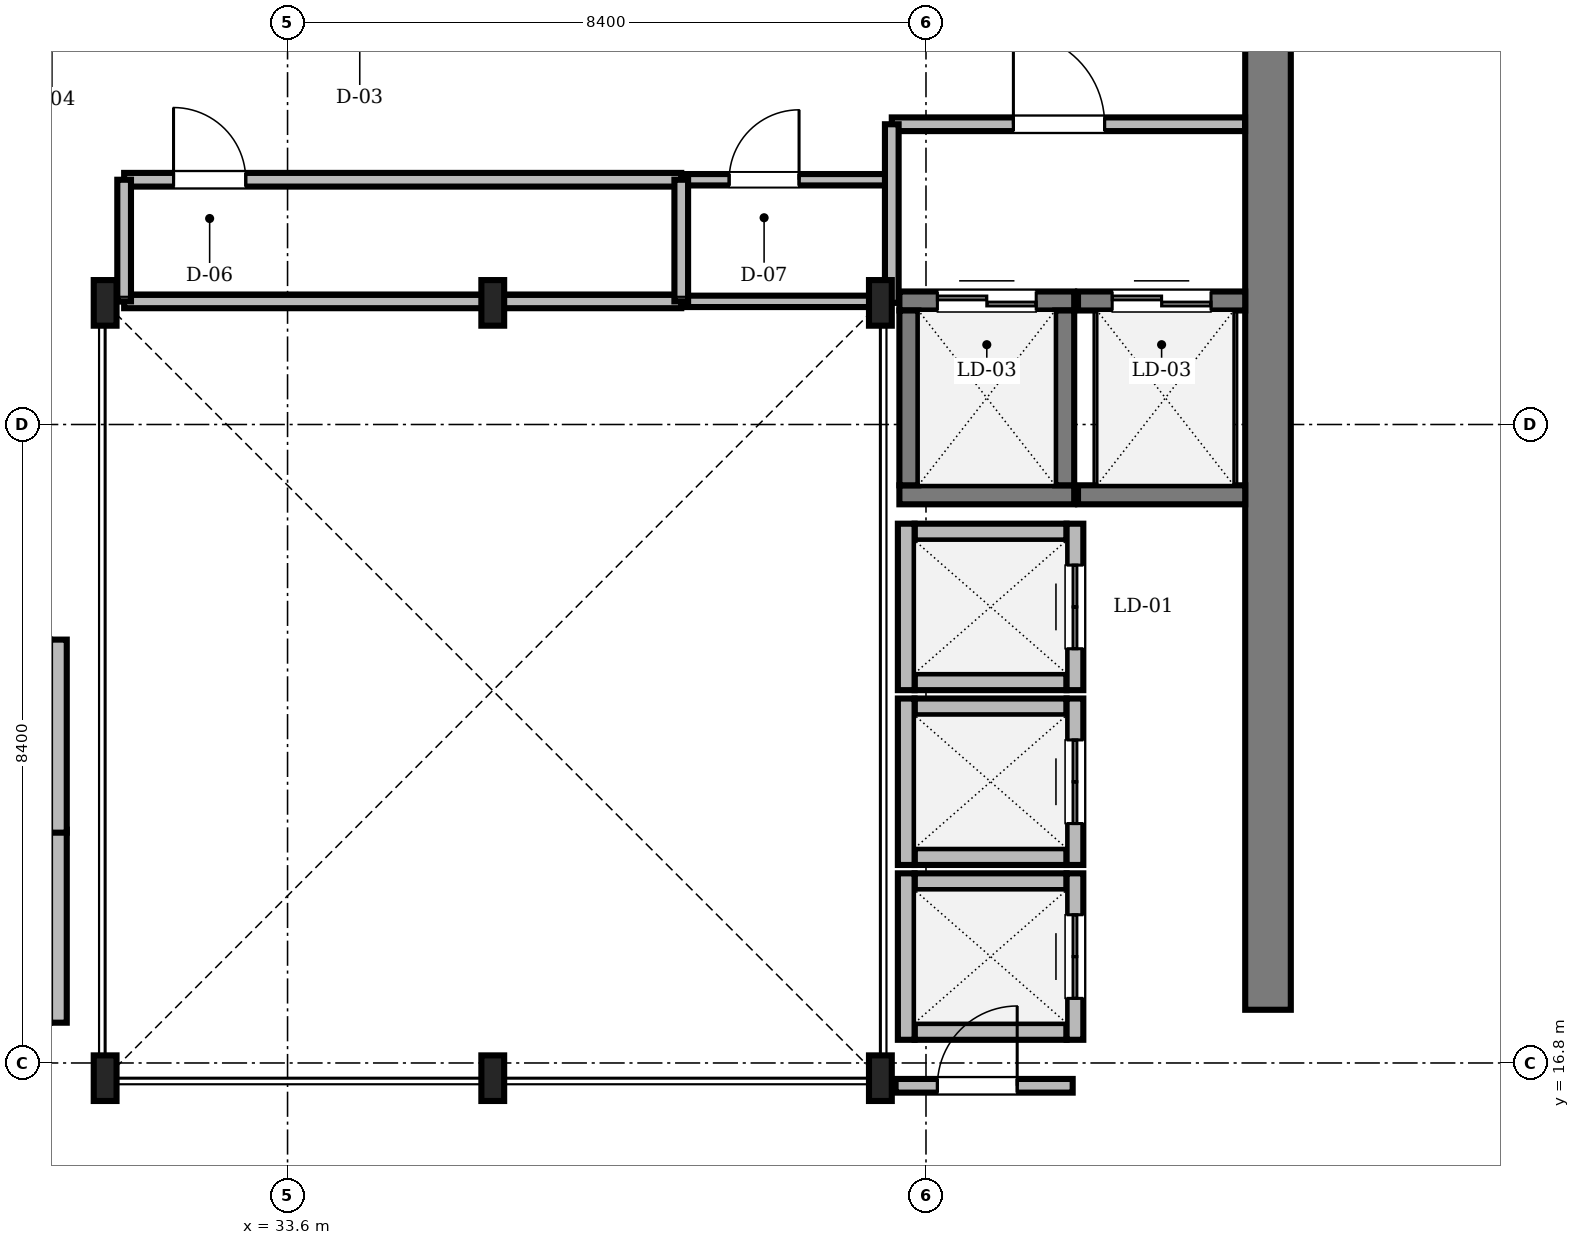
"""IFC4 building model, lengths in metres.
Left out: names, types, materials, properties, quantities, classifications, styles, units other than length and angle.
Written with IfcOpenShell. Run it as: python <this file> out.ifc"""

import sys

from ifc_helpers import new_model, si_unit, direction, frame, frame_2d, origin, origin_2d, place, context, subcontext, project, spatial, rectangle, i_section, extrude, source, transform, mapped, element, fill, save


model = new_model("IFC4")
c1 = context("Model", 3, precision=1e-05, world=origin(), true_north=direction((0.0, 1.0)))
c2 = subcontext(c1, "Body", "Model", "MODEL_VIEW")
j1 = project(units=[si_unit("LENGTHUNIT", "METRE"), si_unit("PLANEANGLEUNIT", "RADIAN")], contexts=[c1])
p1 = place(None, origin())
s1 = spatial("IfcSite", under=j1, at=p1, CompositionType="ELEMENT")
p2 = place(p1, origin())
s2 = spatial("IfcBuilding", under=s1, at=p2, CompositionType="ELEMENT")
p3 = place(p2, frame((0.0, 0.0, 258.5)))
s3 = spatial("IfcBuildingStorey", under=s2, at=p3, CompositionType="ELEMENT", Elevation=258.5)
m1 = source(origin(), c2, "Body", "SweptSolid", [
    extrude(rectangle(XDim=13.15, YDim=0.6, at=frame_2d((6.575, 0.0))), origin(), (0.0, 0.0, 1.0), 3.65),
])
p4 = place(p3, frame((46.5, 17.5, 0.0), z_axis=(0.0, 0.0, 1.0), x_axis=(0.0, 1.0, 0.0)))
e1 = element("IfcWall", 1, at=p4, inside=s3, PredefinedType="SHEAR", context=c2, shape_type="MappedRepresentation", body=[
    mapped(m1, transform((0.0, 0.0, 0.0), scale=1.0)),
])
m2 = source(origin(), c2, "Body", "SweptSolid", [
    extrude(i_section(OverallWidth=0.3, OverallDepth=0.6, WebThickness=0.015, FlangeThickness=0.03, FilletRadius=0.027, at=origin_2d()), origin(), (0.0, 0.0, 1.0), 3.65),
])
for number, where, z_axis, x_axis in (
    (2, (31.2, 16.6, 0.0), (0.0, 0.0, 1.0), (1.0, 0.0, 0.0)),
    (3, (36.3, 16.6, 0.0), (0.0, 0.0, 1.0), (1.0, 0.0, 0.0)),
    (4, (41.4, 16.6, 0.0), (0.0, 0.0, 1.0), (1.0, 0.0, 0.0)),
    (5, (41.4, 26.8, 0.0), (0.0, 0.0, 1.0), (1.0, 0.0, 0.0)),
    (6, (36.3, 26.8, 0.0), (0.0, 0.0, 1.0), (1.0, 0.0, 0.0)),
    (7, (31.2, 26.8, 0.0), (0.0, 0.0, 1.0), (1.0, 0.0, 0.0)),
):
    element("IfcColumn", number, at=place(p3, frame(where, z_axis=z_axis, x_axis=x_axis)), inside=s3, PredefinedType="COLUMN", context=c2, shape_type="MappedRepresentation", body=[
        mapped(m2, transform((0.0, 0.0, 0.0), scale=1.0)),
    ])
m3 = source(origin(), c2, "Body", "SweptSolid", [
    extrude(rectangle(XDim=2.0, YDim=0.22, at=frame_2d((1.0, 0.0))), origin(), (0.0, 0.0, 1.0), 3.65),
])
for number, where, z_axis, x_axis in (
    (8, (41.85, 21.815, 0.0), (0.0, 0.0, 1.0), (1.0, 0.0, 0.0)),
    (9, (41.85, 23.785, 0.0), (0.0, 0.0, 1.0), (1.0, 0.0, 0.0)),
):
    element("IfcWall", number, at=place(p3, frame(where, z_axis=z_axis, x_axis=x_axis)), inside=s3, PredefinedType="SOLIDWALL", context=c2, shape_type="MappedRepresentation", body=[
        mapped(m3, transform((0.0, 0.0, 0.0), scale=1.0)),
    ])
m4 = source(origin(), c2, "Body", "SweptSolid", [
    extrude(rectangle(XDim=2.19, YDim=0.22, at=frame_2d((1.095, 0.0))), origin(), (0.0, 0.0, 1.0), 3.65),
])
p5 = place(p3, frame((41.74, 21.705, 0.0), z_axis=(0.0, 0.0, 1.0), x_axis=(0.0, 1.0, 0.0)))
e10 = element("IfcWall", 10, at=p5, inside=s3, PredefinedType="SOLIDWALL", context=c2, shape_type="MappedRepresentation", body=[
    mapped(m4, transform((0.0, 0.0, 0.0), scale=1.0)),
])
p6 = place(p3, frame((43.96, 21.705, 0.0), z_axis=(0.0, 0.0, 1.0), x_axis=(0.0, 1.0, 0.0)))
e11 = element("IfcWall", 11, at=p6, inside=s3, PredefinedType="SOLIDWALL", context=c2, shape_type="MappedRepresentation", body=[
    mapped(m4, transform((0.0, 0.0, 0.0), scale=1.0)),
])
m5 = source(origin(), c2, "Body", "SweptSolid", [
    extrude(rectangle(XDim=1.1, YDim=2.2, at=frame_2d((0.55, 1.1))), frame((0.0, 0.12, 0.0), z_axis=(0.0, -1.0, 0.0), x_axis=(1.0, 0.0, 0.0)), (0.0, 0.0, 1.0), 0.24),
])
p7 = place(p6, frame((0.545, 0.0, 0.0)))
e12 = element("IfcOpeningElement", 12, at=p7, cuts=e11, PredefinedType="OPENING", context=c2, shape_type="MappedRepresentation", body=[
    mapped(m5, transform((0.0, 0.0, 0.0), scale=1.0)),
])
for number, where, z_axis, x_axis in (
    (13, (41.85, 19.515, 0.0), (0.0, 0.0, 1.0), (1.0, 0.0, 0.0)),
    (14, (41.85, 21.485, 0.0), (0.0, 0.0, 1.0), (1.0, 0.0, 0.0)),
):
    element("IfcWall", number, at=place(p3, frame(where, z_axis=z_axis, x_axis=x_axis)), inside=s3, PredefinedType="SOLIDWALL", context=c2, shape_type="MappedRepresentation", body=[
        mapped(m3, transform((0.0, 0.0, 0.0), scale=1.0)),
    ])
p8 = place(p3, frame((41.74, 19.405, 0.0), z_axis=(0.0, 0.0, 1.0), x_axis=(0.0, 1.0, 0.0)))
e15 = element("IfcWall", 15, at=p8, inside=s3, PredefinedType="SOLIDWALL", context=c2, shape_type="MappedRepresentation", body=[
    mapped(m4, transform((0.0, 0.0, 0.0), scale=1.0)),
])
p9 = place(p3, frame((43.96, 19.405, 0.0), z_axis=(0.0, 0.0, 1.0), x_axis=(0.0, 1.0, 0.0)))
e16 = element("IfcWall", 16, at=p9, inside=s3, PredefinedType="SOLIDWALL", context=c2, shape_type="MappedRepresentation", body=[
    mapped(m4, transform((0.0, 0.0, 0.0), scale=1.0)),
])
p10 = place(p9, frame((0.545, 0.0, 0.0)))
e17 = element("IfcOpeningElement", 17, at=p10, cuts=e16, PredefinedType="OPENING", context=c2, shape_type="MappedRepresentation", body=[
    mapped(m5, transform((0.0, 0.0, 0.0), scale=1.0)),
])
for number, where, z_axis, x_axis in (
    (18, (41.85, 17.215, 0.0), (0.0, 0.0, 1.0), (1.0, 0.0, 0.0)),
    (19, (41.85, 19.185, 0.0), (0.0, 0.0, 1.0), (1.0, 0.0, 0.0)),
):
    element("IfcWall", number, at=place(p3, frame(where, z_axis=z_axis, x_axis=x_axis)), inside=s3, PredefinedType="SOLIDWALL", context=c2, shape_type="MappedRepresentation", body=[
        mapped(m3, transform((0.0, 0.0, 0.0), scale=1.0)),
    ])
p11 = place(p3, frame((41.74, 17.105, 0.0), z_axis=(0.0, 0.0, 1.0), x_axis=(0.0, 1.0, 0.0)))
e20 = element("IfcWall", 20, at=p11, inside=s3, PredefinedType="SOLIDWALL", context=c2, shape_type="MappedRepresentation", body=[
    mapped(m4, transform((0.0, 0.0, 0.0), scale=1.0)),
])
p12 = place(p3, frame((43.96, 17.105, 0.0), z_axis=(0.0, 0.0, 1.0), x_axis=(0.0, 1.0, 0.0)))
e21 = element("IfcWall", 21, at=p12, inside=s3, PredefinedType="SOLIDWALL", context=c2, shape_type="MappedRepresentation", body=[
    mapped(m4, transform((0.0, 0.0, 0.0), scale=1.0)),
])
p13 = place(p12, frame((0.545, 0.0, 0.0)))
e22 = element("IfcOpeningElement", 22, at=p13, cuts=e21, PredefinedType="OPENING", context=c2, shape_type="MappedRepresentation", body=[
    mapped(m5, transform((0.0, 0.0, 0.0), scale=1.0)),
])
m6 = source(origin(), c2, "Body", "SweptSolid", [
    extrude(rectangle(XDim=2.54, YDim=0.22, at=frame_2d((1.27, 0.0))), origin(), (0.0, 0.0, 1.0), 3.65),
])
for number, where, z_axis, x_axis in (
    (23, (30.585, 17.33, 0.0), (0.0, 0.0, 1.0), (0.0, 1.0, 0.0)),
    (24, (30.585, 19.83, 0.0), (0.0, 0.0, 1.0), (0.0, 1.0, 0.0)),
):
    element("IfcWall", number, at=place(p3, frame(where, z_axis=z_axis, x_axis=x_axis)), inside=s3, PredefinedType="SOLIDWALL", context=c2, shape_type="MappedRepresentation", body=[
        mapped(m6, transform((0.0, 0.0, 0.0), scale=1.0)),
    ])
m7 = source(origin(), c2, "Body", "SweptSolid", [
    extrude(rectangle(XDim=2.3, YDim=0.25, at=frame_2d((1.15, 0.0))), origin(), (0.0, 0.0, 1.0), 3.65),
])
p14 = place(p3, frame((41.65, 24.275, 0.0), z_axis=(0.0, 0.0, 1.0), x_axis=(1.0, 0.0, 0.0)))
e25 = element("IfcWall", 25, at=p14, inside=s3, PredefinedType="SOLIDWALL", context=c2, shape_type="MappedRepresentation", body=[
    mapped(m7, transform((0.0, 0.0, 0.0), scale=1.0)),
])
p15 = place(p3, frame((41.65, 26.825, 0.0), z_axis=(0.0, 0.0, 1.0), x_axis=(1.0, 0.0, 0.0)))
e26 = element("IfcWall", 26, at=p15, inside=s3, PredefinedType="SOLIDWALL", context=c2, shape_type="MappedRepresentation", body=[
    mapped(m7, transform((0.0, 0.0, 0.0), scale=1.0)),
])
m8 = source(origin(), c2, "Body", "SweptSolid", [
    extrude(rectangle(XDim=1.3, YDim=2.3, at=frame_2d((0.65, 1.15))), frame((0.0, 0.135, 0.0), z_axis=(0.0, -1.0, 0.0), x_axis=(1.0, 0.0, 0.0)), (0.0, 0.0, 1.0), 0.27),
])
p16 = place(p15, frame((0.5, 0.0, 0.0)))
e27 = element("IfcOpeningElement", 27, at=p16, cuts=e26, PredefinedType="OPENING", context=c2, shape_type="MappedRepresentation", body=[
    mapped(m8, transform((0.0, 0.0, 0.0), scale=1.0)),
])
for number, where, z_axis, x_axis in (
    (28, (41.775, 24.4, 0.0), (0.0, 0.0, 1.0), (0.0, 1.0, 0.0)),
    (29, (43.825, 24.4, 0.0), (0.0, 0.0, 1.0), (0.0, 1.0, 0.0)),
):
    element("IfcWall", number, at=place(p3, frame(where, z_axis=z_axis, x_axis=x_axis)), inside=s3, PredefinedType="SOLIDWALL", context=c2, shape_type="MappedRepresentation", body=[
        mapped(m7, transform((0.0, 0.0, 0.0), scale=1.0)),
    ])
m9 = source(origin(), c2, "Body", "SweptSolid", [
    extrude(rectangle(XDim=2.2, YDim=0.25, at=frame_2d((1.1, 0.0))), origin(), (0.0, 0.0, 1.0), 3.65),
])
p17 = place(p3, frame((44.0, 24.275, 0.0), z_axis=(0.0, 0.0, 1.0), x_axis=(1.0, 0.0, 0.0)))
e30 = element("IfcWall", 30, at=p17, inside=s3, PredefinedType="SOLIDWALL", context=c2, shape_type="MappedRepresentation", body=[
    mapped(m9, transform((0.0, 0.0, 0.0), scale=1.0)),
])
p18 = place(p3, frame((44.0, 26.825, 0.0), z_axis=(0.0, 0.0, 1.0), x_axis=(1.0, 0.0, 0.0)))
e31 = element("IfcWall", 31, at=p18, inside=s3, PredefinedType="SOLIDWALL", context=c2, shape_type="MappedRepresentation", body=[
    mapped(m9, transform((0.0, 0.0, 0.0), scale=1.0)),
])
p19 = place(p18, frame((0.45, 0.0, 0.0)))
e32 = element("IfcOpeningElement", 32, at=p19, cuts=e31, PredefinedType="OPENING", context=c2, shape_type="MappedRepresentation", body=[
    mapped(m8, transform((0.0, 0.0, 0.0), scale=1.0)),
])
m10 = source(origin(), c2, "Body", "SweptSolid", [
    extrude(rectangle(XDim=7.33, YDim=0.18, at=frame_2d((3.665, 0.0))), origin(), (0.0, 0.0, 1.0), 3.282),
])
p20 = place(p3, frame((31.45, 28.42, 0.0), z_axis=(0.0, 0.0, 1.0), x_axis=(1.0, 0.0, 0.0)))
e33 = element("IfcWall", 33, at=p20, inside=s3, PredefinedType="PARTITIONING", context=c2, shape_type="MappedRepresentation", body=[
    mapped(m10, transform((0.0, 0.0, 0.0), scale=1.0)),
])
m11 = source(origin(), c2, "Body", "SweptSolid", [
    extrude(rectangle(XDim=0.95, YDim=2.15, at=frame_2d((0.475, 1.075))), frame((0.0, 0.1, 0.0), z_axis=(0.0, -1.0, 0.0), x_axis=(1.0, 0.0, 0.0)), (0.0, 0.0, 1.0), 0.2),
])
p21 = place(p20, frame((0.65, 0.0, 0.0)))
e34 = element("IfcOpeningElement", 34, at=p21, cuts=e33, PredefinedType="OPENING", context=c2, shape_type="MappedRepresentation", body=[
    mapped(m11, transform((0.0, 0.0, 0.0), scale=1.0)),
])
m12 = source(origin(), c2, "Body", "SweptSolid", [
    extrude(rectangle(XDim=4.648, YDim=0.18, at=frame_2d((2.324, 0.0))), origin(), (0.0, 0.0, 1.0), 3.282),
])
p22 = place(p3, frame((41.55, 29.15, 0.0), z_axis=(0.0, 0.0, 1.0), x_axis=(1.0, 0.0, 0.0)))
e35 = element("IfcWall", 35, at=p22, inside=s3, PredefinedType="PARTITIONING", context=c2, shape_type="MappedRepresentation", body=[
    mapped(m12, transform((0.0, 0.0, 0.0), scale=1.0)),
])
m13 = source(origin(), c2, "Body", "SweptSolid", [
    extrude(rectangle(XDim=1.2, YDim=2.2, at=frame_2d((0.6, 1.1))), frame((0.0, 0.1, 0.0), z_axis=(0.0, -1.0, 0.0), x_axis=(1.0, 0.0, 0.0)), (0.0, 0.0, 1.0), 0.2),
])
p23 = place(p22, frame((1.6, 0.0, 0.0)))
e36 = element("IfcOpeningElement", 36, at=p23, cuts=e35, PredefinedType="OPENING", context=c2, shape_type="MappedRepresentation", body=[
    mapped(m13, transform((0.0, 0.0, 0.0), scale=1.0)),
])
m14 = source(origin(), c2, "Body", "SweptSolid", [
    extrude(rectangle(XDim=2.74, YDim=0.15, at=frame_2d((1.37, 0.0))), origin(), (0.0, 0.0, 1.0), 3.65),
])
p24 = place(p3, frame((38.78, 28.42, 0.0), z_axis=(0.0, 0.0, 1.0), x_axis=(1.0, 0.0, 0.0)))
e37 = element("IfcWall", 37, at=p24, inside=s3, PredefinedType="PARTITIONING", context=c2, shape_type="MappedRepresentation", body=[
    mapped(m14, transform((0.0, 0.0, 0.0), scale=1.0)),
])
m15 = source(origin(), c2, "Body", "SweptSolid", [
    extrude(rectangle(XDim=0.92, YDim=2.1, at=frame_2d((0.46, 1.05))), frame((0.0, 0.085, 0.0), z_axis=(0.0, -1.0, 0.0), x_axis=(1.0, 0.0, 0.0)), (0.0, 0.0, 1.0), 0.17),
])
p25 = place(p24, frame((0.63, 0.0, 0.0)))
e38 = element("IfcOpeningElement", 38, at=p25, cuts=e37, PredefinedType="OPENING", context=c2, shape_type="MappedRepresentation", body=[
    mapped(m15, transform((0.0, 0.0, 0.0), scale=1.0)),
])
m16 = source(origin(), c2, "Body", "SweptSolid", [
    extrude(rectangle(XDim=2.33, YDim=0.18, at=frame_2d((1.165, 0.0))), origin(), (0.0, 0.0, 1.0), 3.092),
])
p26 = place(p3, frame((41.6, 16.5, 0.0), z_axis=(0.0, 0.0, 1.0), x_axis=(1.0, 0.0, 0.0)))
e39 = element("IfcWall", 39, at=p26, inside=s3, PredefinedType="PARTITIONING", context=c2, shape_type="MappedRepresentation", body=[
    mapped(m16, transform((0.0, 0.0, 0.0), scale=1.0)),
])
m17 = source(origin(), c2, "Body", "SweptSolid", [
    extrude(rectangle(XDim=1.05, YDim=2.2, at=frame_2d((0.525, 1.1))), frame((0.0, 0.1, 0.0), z_axis=(0.0, -1.0, 0.0), x_axis=(1.0, 0.0, 0.0)), (0.0, 0.0, 1.0), 0.2),
])
p27 = place(p26, frame((0.55, 0.0, 0.0)))
e40 = element("IfcOpeningElement", 40, at=p27, cuts=e39, PredefinedType="OPENING", context=c2, shape_type="MappedRepresentation", body=[
    mapped(m17, transform((0.0, 0.0, 0.0), scale=1.0)),
])
m18 = source(origin(), c2, "Body", "SweptSolid", [
    extrude(rectangle(XDim=7.33, YDim=0.18, at=frame_2d((3.665, 0.0))), origin(), (0.0, 0.0, 1.0), 3.192),
])
p28 = place(p3, frame((31.45, 26.82, 0.0), z_axis=(0.0, 0.0, 1.0), x_axis=(1.0, 0.0, 0.0)))
e41 = element("IfcWall", 41, at=p28, inside=s3, PredefinedType="PARTITIONING", context=c2, shape_type="MappedRepresentation", body=[
    mapped(m18, transform((0.0, 0.0, 0.0), scale=1.0)),
])
m19 = source(origin(), c2, "Body", "SweptSolid", [
    extrude(rectangle(XDim=2.74, YDim=0.15, at=frame_2d((1.37, 0.0))), origin(), (0.0, 0.0, 1.0), 3.192),
])
p29 = place(p3, frame((38.78, 26.82, 0.0), z_axis=(0.0, 0.0, 1.0), x_axis=(1.0, 0.0, 0.0)))
e42 = element("IfcWall", 42, at=p29, inside=s3, PredefinedType="PARTITIONING", context=c2, shape_type="MappedRepresentation", body=[
    mapped(m19, transform((0.0, 0.0, 0.0), scale=1.0)),
])
m20 = source(origin(), c2, "Body", "SweptSolid", [
    extrude(rectangle(XDim=2.35, YDim=0.18, at=frame_2d((1.175, 0.0))), origin(), (0.0, 0.0, 1.0), 3.282),
])
p30 = place(p3, frame((41.55, 26.8, 0.0), z_axis=(0.0, 0.0, 1.0), x_axis=(0.0, 1.0, 0.0)))
e43 = element("IfcWall", 43, at=p30, inside=s3, PredefinedType="PARTITIONING", context=c2, shape_type="MappedRepresentation", body=[
    mapped(m20, transform((0.0, 0.0, 0.0), scale=1.0)),
])
m21 = source(origin(), c2, "Body", "SweptSolid", [
    extrude(rectangle(XDim=1.6, YDim=0.18, at=frame_2d((0.8, 0.0))), origin(), (0.0, 0.0, 1.0), 3.192),
])
for number, where, z_axis, x_axis in (
    (44, (31.45, 26.82, 0.0), (0.0, 0.0, 1.0), (0.0, 1.0, 0.0)),
    (45, (38.78, 26.82, 0.0), (0.0, 0.0, 1.0), (0.0, 1.0, 0.0)),
):
    element("IfcWall", number, at=place(p3, frame(where, z_axis=z_axis, x_axis=x_axis)), inside=s3, PredefinedType="PARTITIONING", context=c2, shape_type="MappedRepresentation", body=[
        mapped(m21, transform((0.0, 0.0, 0.0), scale=1.0)),
    ])
m22 = source(origin(), c2, "Body", "SweptSolid", [
    extrude(rectangle(XDim=1.1, YDim=2.2, at=frame_2d((0.55, 1.1))), frame((0.0, 0.025, 0.0), z_axis=(0.0, -1.0, 0.0), x_axis=(1.0, 0.0, 0.0)), (0.0, 0.0, 1.0), 0.05),
])
p31 = place(p7, origin())
e46 = element("IfcDoor", 46, at=p31, inside=s3, OperationType="DOUBLE_DOOR_SLIDING", PredefinedType="DOOR", context=c2, shape_type="MappedRepresentation", body=[
    mapped(m22, transform((0.0, 0.0, 0.0), scale=1.0)),
])
fill(e12, e46)
p32 = place(p10, origin())
e47 = element("IfcDoor", 47, at=p32, inside=s3, OperationType="DOUBLE_DOOR_SLIDING", PredefinedType="DOOR", context=c2, shape_type="MappedRepresentation", body=[
    mapped(m22, transform((0.0, 0.0, 0.0), scale=1.0)),
])
fill(e17, e47)
p33 = place(p13, origin())
e48 = element("IfcDoor", 48, at=p33, inside=s3, OperationType="DOUBLE_DOOR_SLIDING", PredefinedType="DOOR", context=c2, shape_type="MappedRepresentation", body=[
    mapped(m22, transform((0.0, 0.0, 0.0), scale=1.0)),
])
fill(e22, e48)
m23 = source(origin(), c2, "Body", "SweptSolid", [
    extrude(rectangle(XDim=1.3, YDim=2.3, at=frame_2d((0.65, 1.15))), frame((0.0, 0.025, 0.0), z_axis=(0.0, -1.0, 0.0), x_axis=(1.0, 0.0, 0.0)), (0.0, 0.0, 1.0), 0.05),
])
p34 = place(p16, origin())
e49 = element("IfcDoor", 49, at=p34, inside=s3, OperationType="DOUBLE_DOOR_SLIDING", PredefinedType="DOOR", context=c2, shape_type="MappedRepresentation", body=[
    mapped(m23, transform((0.0, 0.0, 0.0), scale=1.0)),
])
fill(e27, e49)
p35 = place(p19, origin())
e50 = element("IfcDoor", 50, at=p35, inside=s3, OperationType="DOUBLE_DOOR_SLIDING", PredefinedType="DOOR", context=c2, shape_type="MappedRepresentation", body=[
    mapped(m23, transform((0.0, 0.0, 0.0), scale=1.0)),
])
fill(e32, e50)
m24 = source(origin(), c2, "Body", "SweptSolid", [
    extrude(rectangle(XDim=0.95, YDim=2.15, at=frame_2d((0.475, 1.075))), frame((0.0, 0.025, 0.0), z_axis=(0.0, -1.0, 0.0), x_axis=(1.0, 0.0, 0.0)), (0.0, 0.0, 1.0), 0.05),
])
p36 = place(p21, origin())
e51 = element("IfcDoor", 51, at=p36, inside=s3, OperationType="SINGLE_SWING_LEFT", PredefinedType="DOOR", context=c2, shape_type="MappedRepresentation", body=[
    mapped(m24, transform((0.0, 0.0, 0.0), scale=1.0)),
])
fill(e34, e51)
m25 = source(origin(), c2, "Body", "SweptSolid", [
    extrude(rectangle(XDim=1.2, YDim=2.2, at=frame_2d((0.6, 1.1))), frame((0.0, 0.025, 0.0), z_axis=(0.0, -1.0, 0.0), x_axis=(1.0, 0.0, 0.0)), (0.0, 0.0, 1.0), 0.05),
])
p37 = place(p23, origin())
e52 = element("IfcDoor", 52, at=p37, inside=s3, OperationType="SINGLE_SWING_LEFT", PredefinedType="DOOR", context=c2, shape_type="MappedRepresentation", body=[
    mapped(m25, transform((0.0, 0.0, 0.0), scale=1.0)),
])
fill(e36, e52)
m26 = source(origin(), c2, "Body", "SweptSolid", [
    extrude(rectangle(XDim=0.92, YDim=2.1, at=frame_2d((0.46, 1.05))), frame((0.0, 0.025, 0.0), z_axis=(0.0, -1.0, 0.0), x_axis=(1.0, 0.0, 0.0)), (0.0, 0.0, 1.0), 0.05),
])
p38 = place(p25, origin())
e53 = element("IfcDoor", 53, at=p38, inside=s3, OperationType="SINGLE_SWING_RIGHT", PredefinedType="DOOR", context=c2, shape_type="MappedRepresentation", body=[
    mapped(m26, transform((0.0, 0.0, 0.0), scale=1.0)),
])
fill(e38, e53)
m27 = source(origin(), c2, "Body", "SweptSolid", [
    extrude(rectangle(XDim=1.05, YDim=2.2, at=frame_2d((0.525, 1.1))), frame((0.0, 0.025, 0.0), z_axis=(0.0, -1.0, 0.0), x_axis=(1.0, 0.0, 0.0)), (0.0, 0.0, 1.0), 0.05),
])
p39 = place(p27, origin())
e54 = element("IfcDoor", 54, at=p39, inside=s3, OperationType="SINGLE_SWING_RIGHT", PredefinedType="DOOR", context=c2, shape_type="MappedRepresentation", body=[
    mapped(m27, transform((0.0, 0.0, 0.0), scale=1.0)),
])
fill(e40, e54)
save(model, sys.argv[1])
